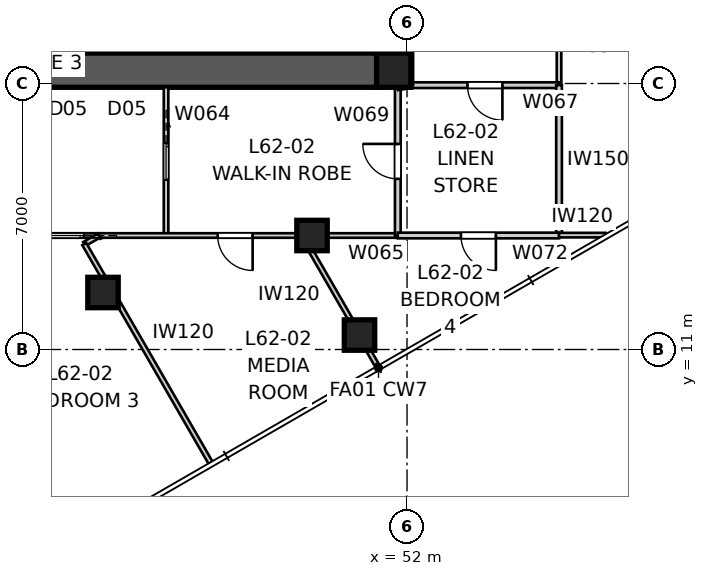
"""IFC4 building model, lengths in metres.
Left out: names, types, materials, properties, quantities, classifications, styles, units other than length and angle.
Written with IfcOpenShell. Run it as: python <this file> out.ifc"""

import sys

from ifc_helpers import new_model, si_unit, direction, frame, frame_2d, origin, origin_2d, place, context, subcontext, project, spatial, polyline, rectangle, outline, extrude, element, fill, save


model = new_model("IFC4")
c1 = context("Model", 3, precision=1e-05, world=origin(), true_north=direction((0.0, 1.0)))
c2 = subcontext(c1, "Body", "Model", "MODEL_VIEW")
j1 = project(units=[si_unit("LENGTHUNIT", "METRE"), si_unit("PLANEANGLEUNIT", "RADIAN")], contexts=[c1])
p1 = place(None, origin())
s1 = spatial("IfcSite", under=j1, at=p1, CompositionType="ELEMENT")
p2 = place(p1, origin())
s2 = spatial("IfcBuilding", under=s1, at=p2, CompositionType="ELEMENT")
p3 = place(p2, frame((0.0, 0.0, 225.2)))
s3 = spatial("IfcBuildingStorey", under=s2, at=p3, CompositionType="ELEMENT", Elevation=225.2)
p4 = place(p3, frame((51.2, 18.35, 0.0), z_axis=(0.0, 0.0, 1.0), x_axis=(-1.0, 0.0, 0.0)))
e1 = element("IfcWall", 1, at=p4, inside=s3, PredefinedType="SHEAR", context=c2, shape_type="SweptSolid", body=[
    extrude(outline(polyline([(0.0, -0.45), (22.4, -0.45), (22.4, -0.025), (22.85, -0.025), (22.85, 0.025), (22.4, 0.025), (22.4, 0.45), (0.0, 0.45), (0.0, 0.025), (-0.45, 0.025), (-0.45, -0.025), (0.0, -0.025), (0.0, -0.45)])), origin(), (0.0, 0.0, 1.0), 3.4),
])
p5 = place(p3, frame((51.65, 18.8, 0.0), z_axis=(0.0, 0.0, 1.0), x_axis=(0.0, 1.0, 0.0)))
e2 = element("IfcWall", 2, at=p5, inside=s3, PredefinedType="SHEAR", context=c2, shape_type="SweptSolid", body=[
    extrude(outline(polyline([(0.0, -0.45), (22.4, -0.45), (22.4, -0.025), (22.85, -0.025), (22.85, 0.025), (22.4, 0.025), (22.4, 0.45), (0.0, 0.45), (0.0, 0.025), (-0.45, 0.025), (-0.45, -0.025), (0.0, -0.025), (0.0, -0.45)])), origin(), (0.0, 0.0, 1.0), 3.4),
])
p6 = place(p5, frame((11.14, 0.0, 0.0)))
e3 = element("IfcOpeningElement", 3, at=p6, cuts=e2, PredefinedType="OPENING", context=c2, shape_type="SweptSolid", body=[
    extrude(rectangle(XDim=1.02, YDim=2.4, at=frame_2d((0.51, 1.2))), frame((0.0, 0.46, 0.0), z_axis=(0.0, -1.0, 0.0), x_axis=(1.0, 0.0, 0.0)), (0.0, 0.0, 1.0), 0.92),
])
p7 = place(p3, frame((51.65, 18.35, 0.0), z_axis=(0.0, 0.0, 1.0), x_axis=(1.0, 0.0, 0.0)))
e4 = element("IfcColumn", 4, at=p7, inside=s3, PredefinedType="COLUMN", context=c2, shape_type="SweptSolid", body=[
    extrude(rectangle(XDim=0.9, YDim=0.9, at=origin_2d()), origin(), (0.0, 0.0, 1.0), 3.4),
])
for number, where, z_axis, x_axis in (
    (5, (50.75, 11.38, 0.0), (0.0, 0.0, 1.0), (1.0, 0.0, 0.0)),
    (6, (44.0, 12.5, 0.0), (0.0, 0.0, 1.0), (1.0, 0.0, 0.0)),
    (7, (49.5, 14.0, 0.0), (0.0, 0.0, 1.0), (1.0, 0.0, 0.0)),
):
    element("IfcColumn", number, at=place(p3, frame(where, z_axis=z_axis, x_axis=x_axis)), inside=s3, PredefinedType="COLUMN", context=c2, shape_type="SweptSolid", body=[
        extrude(rectangle(XDim=0.8, YDim=0.8, at=origin_2d()), origin(), (0.0, 0.0, 1.0), 3.4),
    ])
p8 = place(p3, frame((45.75, 18.8, 0.0), z_axis=(0.0, 0.0, 1.0), x_axis=(0.0, 1.0, 0.0)))
e8 = element("IfcWall", 8, at=p8, inside=s3, PredefinedType="SOLIDWALL", context=c2, shape_type="SweptSolid", body=[
    extrude(rectangle(XDim=5.95, YDim=0.15, at=frame_2d((2.975, 0.0))), origin(), (0.0, 0.0, 1.0), 3.25),
])
p9 = place(p8, frame((2.515, 0.0, 0.0)))
e9 = element("IfcOpeningElement", 9, at=p9, cuts=e8, PredefinedType="OPENING", context=c2, shape_type="SweptSolid", body=[
    extrude(rectangle(XDim=0.92, YDim=2.1, at=frame_2d((0.46, 1.05))), frame((0.0, 0.085, 0.0), z_axis=(0.0, -1.0, 0.0), x_axis=(1.0, 0.0, 0.0)), (0.0, 0.0, 1.0), 0.17),
])
p10 = place(p3, frame((56.0, 28.557, 0.0), z_axis=(0.0, 0.0, 1.0), x_axis=(0.0, -1.0, 0.0)))
e10 = element("IfcWall", 10, at=p10, inside=s3, PredefinedType="PARTITIONING", context=c2, shape_type="SweptSolid", body=[
    extrude(rectangle(XDim=10.601, YDim=0.12, at=frame_2d((5.3, 0.0))), origin(), (0.0, 0.0, 1.0), 2.55),
])
p11 = place(p10, frame((2.989, 0.0, 0.0)))
e11 = element("IfcOpeningElement", 11, at=p11, cuts=e10, PredefinedType="OPENING", context=c2, shape_type="SweptSolid", body=[
    extrude(rectangle(XDim=0.92, YDim=2.34, at=frame_2d((0.46, 1.17))), frame((0.0, 0.07, 0.0), z_axis=(0.0, -1.0, 0.0), x_axis=(1.0, 0.0, 0.0)), (0.0, 0.0, 1.0), 0.14),
])
p12 = place(p3, frame((45.659, 17.9, 0.0), z_axis=(0.0, 0.0, 1.0), x_axis=(0.0, -1.0, 0.0)))
e12 = element("IfcWall", 12, at=p12, inside=s3, PredefinedType="PARTITIONING", context=c2, shape_type="SweptSolid", body=[
    extrude(rectangle(XDim=3.9, YDim=0.12, at=frame_2d((1.95, 0.0))), origin(), (0.0, 0.0, 1.0), 3.25),
])
p13 = place(p12, frame((1.47, 0.0, 0.0)))
e13 = element("IfcOpeningElement", 13, at=p13, cuts=e12, PredefinedType="OPENING", context=c2, shape_type="SweptSolid", body=[
    extrude(rectangle(XDim=0.96, YDim=2.1, at=frame_2d((0.48, 1.05))), frame((0.0, 0.07, 0.0), z_axis=(0.0, -1.0, 0.0), x_axis=(1.0, 0.0, 0.0)), (0.0, 0.0, 1.0), 0.14),
])
p14 = place(p3, frame((51.757, 14.0, 0.0), z_axis=(0.0, 0.0, 1.0), x_axis=(-1.0, 0.0, 0.0)))
e14 = element("IfcWall", 14, at=p14, inside=s3, PredefinedType="PARTITIONING", context=c2, shape_type="SweptSolid", body=[
    extrude(rectangle(XDim=9.726, YDim=0.12, at=frame_2d((4.863, 0.0))), origin(), (0.0, 0.0, 1.0), 2.55),
])
p15 = place(p14, frame((3.82, 0.0, 0.0)))
e15 = element("IfcOpeningElement", 15, at=p15, cuts=e14, PredefinedType="OPENING", context=c2, shape_type="SweptSolid", body=[
    extrude(rectangle(XDim=0.92, YDim=2.34, at=frame_2d((0.46, 1.17))), frame((0.0, 0.07, 0.0), z_axis=(0.0, -1.0, 0.0), x_axis=(1.0, 0.0, 0.0)), (0.0, 0.0, 1.0), 0.14),
])
p16 = place(p14, frame((8.263, 0.0, 0.0)))
e16 = element("IfcOpeningElement", 16, at=p16, cuts=e14, PredefinedType="OPENING", context=c2, shape_type="SweptSolid", body=[
    extrude(rectangle(XDim=0.96, YDim=2.1, at=frame_2d((0.48, 1.05))), frame((0.0, 0.07, 0.0), z_axis=(0.0, -1.0, 0.0), x_axis=(1.0, 0.0, 0.0)), (0.0, 0.0, 1.0), 0.14),
])
p17 = place(p3, frame((56.0, 17.956, 0.0), z_axis=(0.0, 0.0, 1.0), x_axis=(-1.0, 0.0, 0.0)))
e17 = element("IfcWall", 17, at=p17, inside=s3, PredefinedType="SOLIDWALL", context=c2, shape_type="SweptSolid", body=[
    extrude(rectangle(XDim=3.9, YDim=0.15, at=frame_2d((1.95, 0.0))), origin(), (0.0, 0.0, 1.0), 3.25),
])
p18 = place(p17, frame((1.49, 0.0, 0.0)))
e18 = element("IfcOpeningElement", 18, at=p18, cuts=e17, PredefinedType="OPENING", context=c2, shape_type="SweptSolid", body=[
    extrude(rectangle(XDim=0.92, YDim=2.1, at=frame_2d((0.46, 1.05))), frame((0.0, 0.085, 0.0), z_axis=(0.0, -1.0, 0.0), x_axis=(1.0, 0.0, 0.0)), (0.0, 0.0, 1.0), 0.17),
])
p19 = place(p3, frame((52.1, 17.956, 0.0), z_axis=(0.0, 0.0, 1.0), x_axis=(0.0, 1.0, 0.0)))
e19 = element("IfcWall", 19, at=p19, inside=s3, PredefinedType="PARTITIONING", context=c2, shape_type="SweptSolid", body=[
    extrude(rectangle(XDim=0.864, YDim=0.12, at=frame_2d((0.432, 0.0))), origin(), (0.0, 0.0, 1.0), 3.25),
])
p20 = place(p3, frame((51.757, 14.0, 0.0), z_axis=(0.0, 0.0, 1.0), x_axis=(0.0, 1.0, 0.0)))
e20 = element("IfcWall", 20, at=p20, inside=s3, PredefinedType="SOLIDWALL", context=c2, shape_type="SweptSolid", body=[
    extrude(rectangle(XDim=3.9, YDim=0.15, at=frame_2d((1.95, 0.0))), origin(), (0.0, 0.0, 1.0), 3.25),
])
p21 = place(p20, frame((1.49, 0.0, 0.0)))
e21 = element("IfcOpeningElement", 21, at=p21, cuts=e20, PredefinedType="OPENING", context=c2, shape_type="SweptSolid", body=[
    extrude(rectangle(XDim=0.92, YDim=2.1, at=frame_2d((0.46, 1.05))), frame((0.0, 0.085, 0.0), z_axis=(0.0, -1.0, 0.0), x_axis=(1.0, 0.0, 0.0)), (0.0, 0.0, 1.0), 0.17),
])
p22 = place(p3, frame((56.0, 17.956, 0.0), z_axis=(0.0, 0.0, 1.0), x_axis=(0.0, -1.0, 0.0)))
e22 = element("IfcWall", 22, at=p22, inside=s3, PredefinedType="SOLIDWALL", context=c2, shape_type="SweptSolid", body=[
    extrude(rectangle(XDim=3.956, YDim=0.15, at=frame_2d((1.978, 0.0))), origin(), (0.0, 0.0, 1.0), 3.25),
])
p23 = place(p3, frame((56.0, 14.0, 0.0), z_axis=(0.0, 0.0, 1.0), x_axis=(-1.0, 0.0, 0.0)))
e23 = element("IfcWall", 23, at=p23, inside=s3, PredefinedType="SOLIDWALL", context=c2, shape_type="SweptSolid", body=[
    extrude(rectangle(XDim=4.243, YDim=0.15, at=frame_2d((2.122, 0.0))), origin(), (0.0, 0.0, 1.0), 3.25),
])
p24 = place(p23, frame((1.661, 0.0, 0.0)))
e24 = element("IfcOpeningElement", 24, at=p24, cuts=e23, PredefinedType="OPENING", context=c2, shape_type="SweptSolid", body=[
    extrude(rectangle(XDim=0.92, YDim=2.34, at=frame_2d((0.46, 1.17))), frame((0.0, 0.085, 0.0), z_axis=(0.0, -1.0, 0.0), x_axis=(1.0, 0.0, 0.0)), (0.0, 0.0, 1.0), 0.17),
])
p25 = place(p3, frame((57.225, 14.01, 0.0), z_axis=(0.0, 0.0, 1.0), x_axis=(-1.0, 0.0, 0.0)))
e25 = element("IfcWall", 25, at=p25, inside=s3, PredefinedType="PARTITIONING", context=c2, shape_type="SweptSolid", body=[
    extrude(rectangle(XDim=1.225, YDim=0.12, at=frame_2d((0.612, 0.0))), origin(), (0.0, 0.0, 1.0), 3.25),
])
p26 = place(p3, frame((43.219, 5.924, 0.0), z_axis=(0.0, 0.0, 1.0), x_axis=(-0.500003544594, 0.866023357302, 0.0)))
e26 = element("IfcWall", 26, at=p26, inside=s3, PredefinedType="PARTITIONING", context=c2, shape_type="SweptSolid", body=[
    extrude(rectangle(XDim=5.388, YDim=0.12, at=frame_2d((2.694, 0.0))), origin(), (0.0, 0.0, 1.0), 3.25),
])
p27 = place(p3, frame((43.897, 14.0, 0.0), z_axis=(0.0, 0.0, 1.0), x_axis=(-0.865896406789, -0.500223362819, 0.0)))
e27 = element("IfcWall", 27, at=p27, inside=s3, PredefinedType="PARTITIONING", context=c2, shape_type="SweptSolid", body=[
    extrude(rectangle(XDim=0.45, YDim=0.12, at=frame_2d((0.225, 0.0))), origin(), (0.0, 0.0, 1.0), 3.25),
])
p28 = place(p3, frame((43.507, 13.775, 0.0), z_axis=(0.0, 0.0, 1.0), x_axis=(0.500013541994, -0.866017585169, 0.0)))
e28 = element("IfcWall", 28, at=p28, inside=s3, PredefinedType="PARTITIONING", context=c2, shape_type="SweptSolid", body=[
    extrude(rectangle(XDim=6.655, YDim=0.12, at=frame_2d((3.328, 0.0))), origin(), (0.0, 0.0, 1.0), 3.25),
])
p29 = place(p3, frame((51.23, 10.549, 0.0), z_axis=(0.0, 0.0, 1.0), x_axis=(-0.500007073895, 0.866021319631, 0.0)))
e29 = element("IfcWall", 29, at=p29, inside=s3, PredefinedType="PARTITIONING", context=c2, shape_type="SweptSolid", body=[
    extrude(rectangle(XDim=3.985, YDim=0.12, at=frame_2d((1.992, 0.0))), origin(), (0.0, 0.0, 1.0), 3.25),
])
p30 = place(p3, frame((51.757, 17.9, 0.0), z_axis=(0.0, 0.0, 1.0), x_axis=(0.986864404584, 0.161550756622, 0.0)))
e30 = element("IfcWall", 30, at=p30, inside=s3, PredefinedType="SOLIDWALL", context=c2, shape_type="SweptSolid", body=[
    extrude(rectangle(XDim=0.348, YDim=0.15, at=frame_2d((0.174, 0.0))), origin(), (0.0, 0.0, 1.0), 3.25),
])
p31 = place(p18, origin())
e31 = element("IfcDoor", 31, at=p31, inside=s3, OperationType="SINGLE_SWING_LEFT", PredefinedType="DOOR", context=c2, shape_type="SweptSolid", body=[
    extrude(rectangle(XDim=0.92, YDim=2.1, at=frame_2d((0.46, 1.05))), frame((0.0, 0.025, 0.0), z_axis=(0.0, -1.0, 0.0), x_axis=(1.0, 0.0, 0.0)), (0.0, 0.0, 1.0), 0.05),
])
fill(e18, e31)
p32 = place(p24, origin())
e32 = element("IfcDoor", 32, at=p32, inside=s3, OperationType="SINGLE_SWING_LEFT", PredefinedType="DOOR", context=c2, shape_type="SweptSolid", body=[
    extrude(rectangle(XDim=0.92, YDim=2.34, at=frame_2d((0.46, 1.17))), frame((0.0, 0.025, 0.0), z_axis=(0.0, -1.0, 0.0), x_axis=(1.0, 0.0, 0.0)), (0.0, 0.0, 1.0), 0.05),
])
fill(e24, e32)
p33 = place(p21, origin())
e33 = element("IfcDoor", 33, at=p33, inside=s3, OperationType="SINGLE_SWING_RIGHT", PredefinedType="DOOR", context=c2, shape_type="SweptSolid", body=[
    extrude(rectangle(XDim=0.92, YDim=2.1, at=frame_2d((0.46, 1.05))), frame((0.0, 0.025, 0.0), z_axis=(0.0, -1.0, 0.0), x_axis=(1.0, 0.0, 0.0)), (0.0, 0.0, 1.0), 0.05),
])
fill(e21, e33)
p34 = place(p13, origin())
e34 = element("IfcDoor", 34, at=p34, inside=s3, OperationType="SLIDING_TO_LEFT", PredefinedType="DOOR", context=c2, shape_type="SweptSolid", body=[
    extrude(rectangle(XDim=0.96, YDim=2.1, at=frame_2d((0.48, 1.05))), frame((0.0, 0.025, 0.0), z_axis=(0.0, -1.0, 0.0), x_axis=(1.0, 0.0, 0.0)), (0.0, 0.0, 1.0), 0.05),
])
fill(e13, e34)
p35 = place(p15, origin())
e35 = element("IfcDoor", 35, at=p35, inside=s3, OperationType="SINGLE_SWING_LEFT", PredefinedType="DOOR", context=c2, shape_type="SweptSolid", body=[
    extrude(rectangle(XDim=0.92, YDim=2.34, at=frame_2d((0.46, 1.17))), frame((0.0, 0.025, 0.0), z_axis=(0.0, -1.0, 0.0), x_axis=(1.0, 0.0, 0.0)), (0.0, 0.0, 1.0), 0.05),
])
fill(e15, e35)
p36 = place(p16, origin())
e36 = element("IfcDoor", 36, at=p36, inside=s3, OperationType="SLIDING_TO_LEFT", PredefinedType="DOOR", context=c2, shape_type="SweptSolid", body=[
    extrude(rectangle(XDim=0.96, YDim=2.1, at=frame_2d((0.48, 1.05))), frame((0.0, 0.025, 0.0), z_axis=(0.0, -1.0, 0.0), x_axis=(1.0, 0.0, 0.0)), (0.0, 0.0, 1.0), 0.05),
])
fill(e16, e36)
save(model, sys.argv[1])
